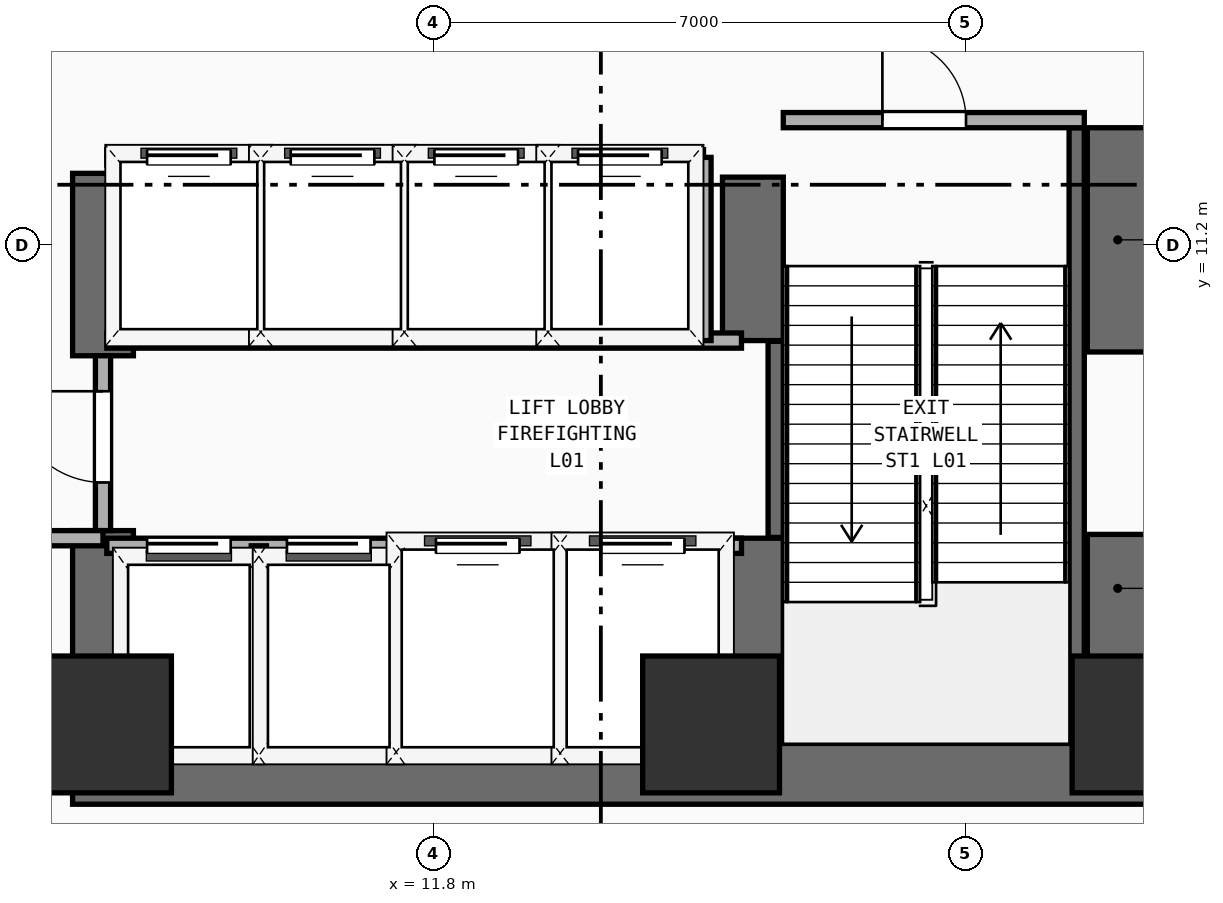
"""IFC4 building model, lengths in metres.
Left out: names, types, materials, properties, quantities, classifications, styles, units other than length and angle.
Written with IfcOpenShell. Run it as: python <this file> out.ifc"""

import sys

from ifc_helpers import new_model, si_unit, direction, frame, frame_2d, origin, origin_2d, place, context, subcontext, project, spatial, rectangle, extrude, element, fill, save


model = new_model("IFC4")
c1 = context("Model", 3, precision=1e-05, world=origin(), true_north=direction((0.0, 1.0)))
c2 = subcontext(c1, "Body", "Model", "MODEL_VIEW")
j1 = project(units=[si_unit("LENGTHUNIT", "METRE"), si_unit("PLANEANGLEUNIT", "RADIAN")], contexts=[c1])
p1 = place(None, origin())
s1 = spatial("IfcSite", under=j1, at=p1, CompositionType="ELEMENT")
p2 = place(p1, origin())
s2 = spatial("IfcBuilding", under=s1, at=p2, CompositionType="ELEMENT")
p3 = place(p2, origin())
s3 = spatial("IfcBuildingStorey", under=s2, at=p3, CompositionType="ELEMENT", Elevation=0.0)
p4 = place(p3, frame((7.05, 4.25, 0.0), z_axis=(0.0, 0.0, 1.0), x_axis=(1.0, 0.0, 0.0)))
e1 = element("IfcWall", 1, at=p4, inside=s3, PredefinedType="SHEAR", context=c2, shape_type="SweptSolid", body=[
    extrude(rectangle(XDim=14.15, YDim=0.8, at=frame_2d((7.075, 0.0))), origin(), (0.0, 0.0, 1.0), 5.26),
])
p5 = place(p3, frame((7.45, 4.65, 0.0), z_axis=(0.0, 0.0, 1.0), x_axis=(0.0, 1.0, 0.0)))
e2 = element("IfcWall", 2, at=p5, inside=s3, PredefinedType="SHEAR", context=c2, shape_type="SweptSolid", body=[
    extrude(rectangle(XDim=2.8, YDim=0.8, at=frame_2d((1.4, 0.0))), origin(), (0.0, 0.0, 1.0), 5.26),
])
p6 = place(p3, frame((7.45, 9.75, 0.0), z_axis=(0.0, 0.0, 1.0), x_axis=(0.0, 1.0, 0.0)))
e3 = element("IfcWall", 3, at=p6, inside=s3, PredefinedType="SHEAR", context=c2, shape_type="SweptSolid", body=[
    extrude(rectangle(XDim=2.4, YDim=0.8, at=frame_2d((1.2, 0.0))), origin(), (0.0, 0.0, 1.0), 5.26),
])
p7 = place(p3, frame((20.8, 4.65, 0.0), z_axis=(0.0, 0.0, 1.0), x_axis=(0.0, 1.0, 0.0)))
e4 = element("IfcWall", 4, at=p7, inside=s3, PredefinedType="SHEAR", context=c2, shape_type="SweptSolid", body=[
    extrude(rectangle(XDim=2.75, YDim=0.8, at=frame_2d((1.375, 0.0))), origin(), (0.0, 0.0, 1.0), 5.26),
])
p8 = place(p3, frame((20.8, 9.8, 0.0), z_axis=(0.0, 0.0, 1.0), x_axis=(0.0, 1.0, 0.0)))
e5 = element("IfcWall", 5, at=p8, inside=s3, PredefinedType="SHEAR", context=c2, shape_type="SweptSolid", body=[
    extrude(rectangle(XDim=2.95, YDim=0.8, at=frame_2d((1.475, 0.0))), origin(), (0.0, 0.0, 1.0), 5.26),
])
p9 = place(p3, frame((16.0, 4.65, 0.0), z_axis=(0.0, 0.0, 1.0), x_axis=(0.0, 1.0, 0.0)))
e6 = element("IfcWall", 6, at=p9, inside=s3, PredefinedType="SHEAR", context=c2, shape_type="SweptSolid", body=[
    extrude(rectangle(XDim=2.7, YDim=0.8, at=frame_2d((1.35, 0.0))), origin(), (0.0, 0.0, 1.0), 5.26),
])
p10 = place(p3, frame((16.0, 9.95, 0.0), z_axis=(0.0, 0.0, 1.0), x_axis=(0.0, 1.0, 0.0)))
e7 = element("IfcWall", 7, at=p10, inside=s3, PredefinedType="SHEAR", context=c2, shape_type="SweptSolid", body=[
    extrude(rectangle(XDim=2.15, YDim=0.8, at=frame_2d((1.075, 0.0))), origin(), (0.0, 0.0, 1.0), 5.26),
])
for number, where, z_axis, x_axis in (
    (8, (7.45, 4.9, 0.0), (0.0, 0.0, 1.0), (1.0, 0.0, 0.0)),
    (9, (15.45, 4.9, 0.0), (0.0, 0.0, 1.0), (1.0, 0.0, 0.0)),
    (10, (21.1, 4.9, 0.0), (0.0, 0.0, 1.0), (1.0, 0.0, 0.0)),
):
    element("IfcColumn", number, at=place(p3, frame(where, z_axis=z_axis, x_axis=x_axis)), inside=s3, PredefinedType="COLUMN", context=c2, shape_type="SweptSolid", body=[
        extrude(rectangle(XDim=1.8, YDim=1.8, at=origin_2d()), origin(), (0.0, 0.0, 1.0), 5.26),
    ])
p11 = place(p3, frame((16.3, 7.36, 0.0), z_axis=(0.0, 0.0, 1.0), x_axis=(0.0, 1.0, 0.0)))
e11 = element("IfcWall", 11, at=p11, inside=s3, PredefinedType="SHEAR", context=c2, shape_type="SweptSolid", body=[
    extrude(rectangle(XDim=2.58, YDim=0.2, at=frame_2d((1.29, 0.0))), origin(), (0.0, 0.0, 1.0), 5.26),
])
p12 = place(p3, frame((20.26, 4.66, 0.0), z_axis=(0.0, 0.0, 1.0), x_axis=(0.0, 1.0, 0.0)))
e12 = element("IfcWall", 12, at=p12, inside=s3, PredefinedType="SHEAR", context=c2, shape_type="SweptSolid", body=[
    extrude(rectangle(XDim=8.09, YDim=0.2, at=frame_2d((4.045, 0.0))), origin(), (0.0, 0.0, 1.0), 5.26),
])
p13 = place(p3, frame((16.4, 12.85, 0.0), z_axis=(0.0, 0.0, 1.0), x_axis=(1.0, 0.0, 0.0)))
e13 = element("IfcWall", 13, at=p13, inside=s3, PredefinedType="PARTITIONING", context=c2, shape_type="SweptSolid", body=[
    extrude(rectangle(XDim=3.96, YDim=0.2, at=frame_2d((1.98, 0.0))), origin(), (0.0, 0.0, 1.0), 5.26),
])
p14 = place(p13, frame((1.304, 0.0, 0.0)))
e14 = element("IfcOpeningElement", 14, at=p14, cuts=e13, PredefinedType="OPENING", context=c2, shape_type="SweptSolid", body=[
    extrude(rectangle(XDim=1.1, YDim=2.2, at=frame_2d((0.55, 1.1))), frame((0.0, 0.11, 0.0), z_axis=(0.0, -1.0, 0.0), x_axis=(1.0, 0.0, 0.0)), (0.0, 0.0, 1.0), 0.22),
])
p15 = place(p3, frame((7.5, 7.25, 0.0), z_axis=(0.0, 0.0, 1.0), x_axis=(1.0, 0.0, 0.0)))
e15 = element("IfcWall", 15, at=p15, inside=s3, PredefinedType="PARTITIONING", context=c2, shape_type="SweptSolid", body=[
    extrude(rectangle(XDim=8.35, YDim=0.2, at=frame_2d((4.175, 0.0))), origin(), (0.0, 0.0, 1.0), 5.26),
])
p16 = place(p15, frame((0.53, 0.0, 0.0)))
e16 = element("IfcOpeningElement", 16, at=p16, cuts=e15, PredefinedType="OPENING", context=c2, shape_type="SweptSolid", body=[
    extrude(rectangle(XDim=1.1, YDim=2.2, at=frame_2d((0.55, 1.1))), frame((0.0, 0.11, 0.0), z_axis=(0.0, -1.0, 0.0), x_axis=(1.0, 0.0, 0.0)), (0.0, 0.0, 1.0), 0.22),
])
p17 = place(p15, frame((2.37, 0.0, 0.0)))
e17 = element("IfcOpeningElement", 17, at=p17, cuts=e15, PredefinedType="OPENING", context=c2, shape_type="SweptSolid", body=[
    extrude(rectangle(XDim=1.1, YDim=2.2, at=frame_2d((0.55, 1.1))), frame((0.0, 0.11, 0.0), z_axis=(0.0, -1.0, 0.0), x_axis=(1.0, 0.0, 0.0)), (0.0, 0.0, 1.0), 0.22),
])
p18 = place(p15, frame((4.33, 0.0, 0.0)))
e18 = element("IfcOpeningElement", 18, at=p18, cuts=e15, PredefinedType="OPENING", context=c2, shape_type="SweptSolid", body=[
    extrude(rectangle(XDim=1.1, YDim=2.2, at=frame_2d((0.55, 1.1))), frame((0.0, 0.11, 0.0), z_axis=(0.0, -1.0, 0.0), x_axis=(1.0, 0.0, 0.0)), (0.0, 0.0, 1.0), 0.22),
])
p19 = place(p15, frame((6.5, 0.0, 0.0)))
e19 = element("IfcOpeningElement", 19, at=p19, cuts=e15, PredefinedType="OPENING", context=c2, shape_type="SweptSolid", body=[
    extrude(rectangle(XDim=1.1, YDim=2.2, at=frame_2d((0.55, 1.1))), frame((0.0, 0.11, 0.0), z_axis=(0.0, -1.0, 0.0), x_axis=(1.0, 0.0, 0.0)), (0.0, 0.0, 1.0), 0.22),
])
p20 = place(p3, frame((7.5, 9.95, 0.0), z_axis=(0.0, 0.0, 1.0), x_axis=(1.0, 0.0, 0.0)))
e20 = element("IfcWall", 20, at=p20, inside=s3, PredefinedType="PARTITIONING", context=c2, shape_type="SweptSolid", body=[
    extrude(rectangle(XDim=8.35, YDim=0.2, at=frame_2d((4.175, 0.0))), origin(), (0.0, 0.0, 1.0), 5.26),
])
for number, where, z_axis, x_axis in (
    (21, (9.5, 4.45, 0.0), (0.0, 0.0, 1.0), (0.0, 1.0, 0.0)),
    (22, (11.36, 4.45, 0.0), (0.0, 0.0, 1.0), (0.0, 1.0, 0.0)),
    (23, (13.46, 4.45, 0.0), (0.0, 0.0, 1.0), (0.0, 1.0, 0.0)),
):
    element("IfcWall", number, at=place(p3, frame(where, z_axis=z_axis, x_axis=x_axis)), inside=s3, PredefinedType="PARTITIONING", context=c2, shape_type="SweptSolid", body=[
        extrude(rectangle(XDim=2.8, YDim=0.2, at=frame_2d((1.4, 0.0))), origin(), (0.0, 0.0, 1.0), 5.26),
    ])
p21 = place(p3, frame((7.45, 7.45, 0.0), z_axis=(0.0, 0.0, 1.0), x_axis=(0.0, 1.0, 0.0)))
e24 = element("IfcWall", 24, at=p21, inside=s3, PredefinedType="PARTITIONING", context=c2, shape_type="SweptSolid", body=[
    extrude(rectangle(XDim=2.3, YDim=0.2, at=frame_2d((1.15, 0.0))), origin(), (0.0, 0.0, 1.0), 4.04),
])
p22 = place(p21, frame((0.633, 0.0, 0.0)))
e25 = element("IfcOpeningElement", 25, at=p22, cuts=e24, PredefinedType="OPENING", context=c2, shape_type="SweptSolid", body=[
    extrude(rectangle(XDim=1.2, YDim=2.25, at=frame_2d((0.6, 1.125))), frame((0.0, 0.11, 0.0), z_axis=(0.0, -1.0, 0.0), x_axis=(1.0, 0.0, 0.0)), (0.0, 0.0, 1.0), 0.22),
])
p23 = place(p3, frame((7.5, 12.36, 0.0), z_axis=(0.0, 0.0, 1.0), x_axis=(1.0, 0.0, 0.0)))
e26 = element("IfcWall", 26, at=p23, inside=s3, PredefinedType="PARTITIONING", context=c2, shape_type="SweptSolid", body=[
    extrude(rectangle(XDim=7.85, YDim=0.2, at=frame_2d((3.925, 0.0))), origin(), (0.0, 0.0, 1.0), 5.26),
])
p24 = place(p23, frame((0.53, 0.0, 0.0)))
e27 = element("IfcOpeningElement", 27, at=p24, cuts=e26, PredefinedType="OPENING", context=c2, shape_type="SweptSolid", body=[
    extrude(rectangle(XDim=1.1, YDim=2.2, at=frame_2d((0.55, 1.1))), frame((0.0, 0.11, 0.0), z_axis=(0.0, -1.0, 0.0), x_axis=(1.0, 0.0, 0.0)), (0.0, 0.0, 1.0), 0.22),
])
p25 = place(p23, frame((2.42, 0.0, 0.0)))
e28 = element("IfcOpeningElement", 28, at=p25, cuts=e26, PredefinedType="OPENING", context=c2, shape_type="SweptSolid", body=[
    extrude(rectangle(XDim=1.1, YDim=2.2, at=frame_2d((0.55, 1.1))), frame((0.0, 0.11, 0.0), z_axis=(0.0, -1.0, 0.0), x_axis=(1.0, 0.0, 0.0)), (0.0, 0.0, 1.0), 0.22),
])
p26 = place(p23, frame((4.31, 0.0, 0.0)))
e29 = element("IfcOpeningElement", 29, at=p26, cuts=e26, PredefinedType="OPENING", context=c2, shape_type="SweptSolid", body=[
    extrude(rectangle(XDim=1.1, YDim=2.2, at=frame_2d((0.55, 1.1))), frame((0.0, 0.11, 0.0), z_axis=(0.0, -1.0, 0.0), x_axis=(1.0, 0.0, 0.0)), (0.0, 0.0, 1.0), 0.22),
])
p27 = place(p23, frame((6.2, 0.0, 0.0)))
e30 = element("IfcOpeningElement", 30, at=p27, cuts=e26, PredefinedType="OPENING", context=c2, shape_type="SweptSolid", body=[
    extrude(rectangle(XDim=1.1, YDim=2.2, at=frame_2d((0.55, 1.1))), frame((0.0, 0.11, 0.0), z_axis=(0.0, -1.0, 0.0), x_axis=(1.0, 0.0, 0.0)), (0.0, 0.0, 1.0), 0.22),
])
for number, where, z_axis, x_axis in (
    (31, (15.35, 9.95, 0.0), (0.0, 0.0, 1.0), (0.0, 1.0, 0.0)),
    (32, (9.52, 9.95, 0.0), (0.0, 0.0, 1.0), (0.0, 1.0, 0.0)),
    (33, (11.41, 9.95, 0.0), (0.0, 0.0, 1.0), (0.0, 1.0, 0.0)),
    (34, (13.3, 9.95, 0.0), (0.0, 0.0, 1.0), (0.0, 1.0, 0.0)),
):
    element("IfcWall", number, at=place(p3, frame(where, z_axis=z_axis, x_axis=x_axis)), inside=s3, PredefinedType="PARTITIONING", context=c2, shape_type="SweptSolid", body=[
        extrude(rectangle(XDim=2.41, YDim=0.2, at=frame_2d((1.205, 0.0))), origin(), (0.0, 0.0, 1.0), 5.26),
    ])
p28 = place(p3, frame((0.42, 7.35, 0.0), z_axis=(0.0, 0.0, 1.0), x_axis=(1.0, 0.0, 0.0)))
e35 = element("IfcWall", 35, at=p28, inside=s3, PredefinedType="PARTITIONING", context=c2, shape_type="SweptSolid", body=[
    extrude(rectangle(XDim=7.03, YDim=0.2, at=frame_2d((3.515, 0.0))), origin(), (0.0, 0.0, 1.0), 5.26),
])
p29 = place(p28, frame((3.93, 0.0, 0.0)))
e36 = element("IfcOpeningElement", 36, at=p29, cuts=e35, PredefinedType="OPENING", context=c2, shape_type="SweptSolid", body=[
    extrude(rectangle(XDim=1.1, YDim=2.2, at=frame_2d((0.55, 1.1))), frame((0.0, 0.11, 0.0), z_axis=(0.0, -1.0, 0.0), x_axis=(1.0, 0.0, 0.0)), (0.0, 0.0, 1.0), 0.22),
])
p30 = place(p14, frame((1.1, 0.0, 0.0), z_axis=(0.0, 0.0, 1.0), x_axis=(-1.0, 0.0, 0.0)))
e37 = element("IfcDoor", 37, at=p30, inside=s3, OperationType="SINGLE_SWING_RIGHT", PredefinedType="DOOR", context=c2, shape_type="SweptSolid", body=[
    extrude(rectangle(XDim=1.1, YDim=2.2, at=frame_2d((0.55, 1.1))), frame((0.0, 0.025, 0.0), z_axis=(0.0, -1.0, 0.0), x_axis=(1.0, 0.0, 0.0)), (0.0, 0.0, 1.0), 0.05),
])
fill(e14, e37)
p31 = place(p16, origin())
e38 = element("IfcDoor", 38, at=p31, inside=s3, OperationType="SLIDING_TO_LEFT", PredefinedType="DOOR", context=c2, shape_type="SweptSolid", body=[
    extrude(rectangle(XDim=1.1, YDim=2.2, at=frame_2d((0.55, 1.1))), frame((0.0, 0.025, 0.0), z_axis=(0.0, -1.0, 0.0), x_axis=(1.0, 0.0, 0.0)), (0.0, 0.0, 1.0), 0.05),
])
fill(e16, e38)
p32 = place(p17, origin())
e39 = element("IfcDoor", 39, at=p32, inside=s3, OperationType="SLIDING_TO_LEFT", PredefinedType="DOOR", context=c2, shape_type="SweptSolid", body=[
    extrude(rectangle(XDim=1.1, YDim=2.2, at=frame_2d((0.55, 1.1))), frame((0.0, 0.025, 0.0), z_axis=(0.0, -1.0, 0.0), x_axis=(1.0, 0.0, 0.0)), (0.0, 0.0, 1.0), 0.05),
])
fill(e17, e39)
p33 = place(p18, origin())
e40 = element("IfcDoor", 40, at=p33, inside=s3, OperationType="SLIDING_TO_LEFT", PredefinedType="DOOR", context=c2, shape_type="SweptSolid", body=[
    extrude(rectangle(XDim=1.1, YDim=2.2, at=frame_2d((0.55, 1.1))), frame((0.0, 0.025, 0.0), z_axis=(0.0, -1.0, 0.0), x_axis=(1.0, 0.0, 0.0)), (0.0, 0.0, 1.0), 0.05),
])
fill(e18, e40)
p34 = place(p19, origin())
e41 = element("IfcDoor", 41, at=p34, inside=s3, OperationType="SLIDING_TO_LEFT", PredefinedType="DOOR", context=c2, shape_type="SweptSolid", body=[
    extrude(rectangle(XDim=1.1, YDim=2.2, at=frame_2d((0.55, 1.1))), frame((0.0, 0.025, 0.0), z_axis=(0.0, -1.0, 0.0), x_axis=(1.0, 0.0, 0.0)), (0.0, 0.0, 1.0), 0.05),
])
fill(e19, e41)
p35 = place(p22, frame((1.2, 0.0, 0.0), z_axis=(0.0, 0.0, 1.0), x_axis=(-1.0, 0.0, 0.0)))
e42 = element("IfcDoor", 42, at=p35, inside=s3, OperationType="SINGLE_SWING_LEFT", PredefinedType="DOOR", context=c2, shape_type="SweptSolid", body=[
    extrude(rectangle(XDim=1.2, YDim=2.25, at=frame_2d((0.6, 1.125))), frame((0.0, 0.025, 0.0), z_axis=(0.0, -1.0, 0.0), x_axis=(1.0, 0.0, 0.0)), (0.0, 0.0, 1.0), 0.05),
])
fill(e25, e42)
p36 = place(p24, origin())
e43 = element("IfcDoor", 43, at=p36, inside=s3, OperationType="SLIDING_TO_LEFT", PredefinedType="DOOR", context=c2, shape_type="SweptSolid", body=[
    extrude(rectangle(XDim=1.1, YDim=2.2, at=frame_2d((0.55, 1.1))), frame((0.0, 0.025, 0.0), z_axis=(0.0, -1.0, 0.0), x_axis=(1.0, 0.0, 0.0)), (0.0, 0.0, 1.0), 0.05),
])
fill(e27, e43)
p37 = place(p25, origin())
e44 = element("IfcDoor", 44, at=p37, inside=s3, OperationType="SLIDING_TO_LEFT", PredefinedType="DOOR", context=c2, shape_type="SweptSolid", body=[
    extrude(rectangle(XDim=1.1, YDim=2.2, at=frame_2d((0.55, 1.1))), frame((0.0, 0.025, 0.0), z_axis=(0.0, -1.0, 0.0), x_axis=(1.0, 0.0, 0.0)), (0.0, 0.0, 1.0), 0.05),
])
fill(e28, e44)
p38 = place(p26, origin())
e45 = element("IfcDoor", 45, at=p38, inside=s3, OperationType="SLIDING_TO_LEFT", PredefinedType="DOOR", context=c2, shape_type="SweptSolid", body=[
    extrude(rectangle(XDim=1.1, YDim=2.2, at=frame_2d((0.55, 1.1))), frame((0.0, 0.025, 0.0), z_axis=(0.0, -1.0, 0.0), x_axis=(1.0, 0.0, 0.0)), (0.0, 0.0, 1.0), 0.05),
])
fill(e29, e45)
p39 = place(p27, origin())
e46 = element("IfcDoor", 46, at=p39, inside=s3, OperationType="SLIDING_TO_LEFT", PredefinedType="DOOR", context=c2, shape_type="SweptSolid", body=[
    extrude(rectangle(XDim=1.1, YDim=2.2, at=frame_2d((0.55, 1.1))), frame((0.0, 0.025, 0.0), z_axis=(0.0, -1.0, 0.0), x_axis=(1.0, 0.0, 0.0)), (0.0, 0.0, 1.0), 0.05),
])
fill(e30, e46)
save(model, sys.argv[1])
